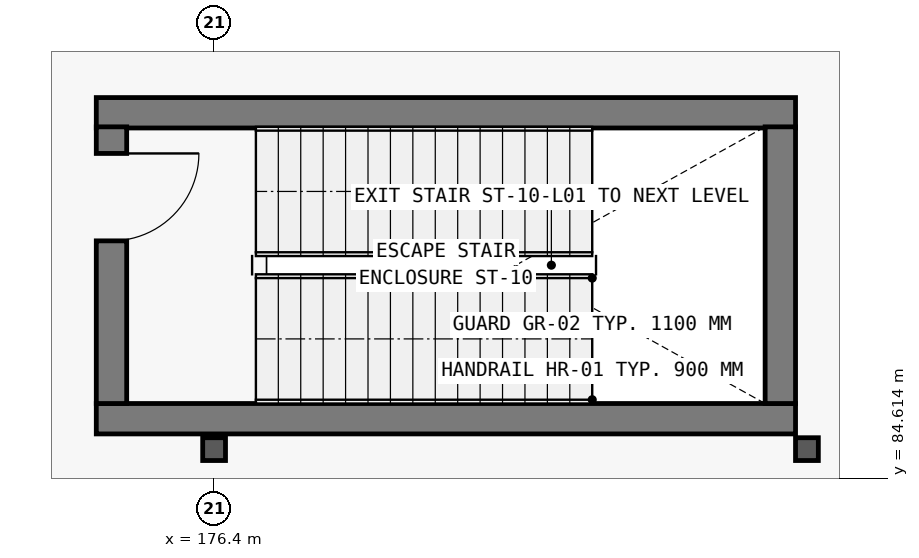
"""IFC4 building model, lengths in metres.
Left out: names, types, materials, properties, quantities, classifications, styles, units other than length and angle.
Written with IfcOpenShell. Run it as: python <this file> out.ifc"""

import sys

from ifc_helpers import new_model, si_unit, direction, frame, frame_2d, origin, origin_2d, place, context, subcontext, project, spatial, rectangle, i_section, extrude, element, fill, save


model = new_model("IFC4")
c1 = context("Model", 3, precision=1e-05, world=origin(), true_north=direction((0.0, 1.0)))
c2 = subcontext(c1, "Body", "Model", "MODEL_VIEW")
j1 = project(units=[si_unit("LENGTHUNIT", "METRE"), si_unit("PLANEANGLEUNIT", "RADIAN")], contexts=[c1])
p1 = place(None, origin())
s1 = spatial("IfcSite", under=j1, at=p1, CompositionType="ELEMENT")
p2 = place(p1, origin())
s2 = spatial("IfcBuilding", under=s1, at=p2, CompositionType="ELEMENT")
p3 = place(p2, frame((0.0, 0.0, 5.4)))
s3 = spatial("IfcBuildingStorey", under=s2, at=p3, CompositionType="ELEMENT", Elevation=5.4)
for number, where, z_axis, x_axis in (
    (1, (176.4, 85.0, 0.0), (0.0, 0.0, 1.0), (1.0, 0.0, 0.0)),
    (2, (184.2, 85.0, 0.0), (0.0, 0.0, 1.0), (1.0, 0.0, 0.0)),
):
    element("IfcColumn", number, at=place(p3, frame(where, z_axis=z_axis, x_axis=x_axis)), inside=s3, PredefinedType="COLUMN", context=c2, shape_type="SweptSolid", body=[
        extrude(i_section(OverallWidth=0.3, OverallDepth=0.3, WebThickness=0.011, FlangeThickness=0.019, at=origin_2d()), origin(), (0.0, 0.0, 1.0), 5.4),
    ])
for number, where, z_axis, x_axis in (
    (3, (174.85, 85.4, 0.0), (0.0, 0.0, 1.0), (1.0, 0.0, 0.0)),
    (4, (184.05, 89.425, 0.0), (0.0, 0.0, 1.0), (-1.0, 0.0, 0.0)),
):
    element("IfcWall", number, at=place(p3, frame(where, z_axis=z_axis, x_axis=x_axis)), inside=s3, PredefinedType="SHEAR", context=c2, shape_type="SweptSolid", body=[
        extrude(rectangle(XDim=9.2, YDim=0.4, at=frame_2d((4.6, 0.0))), origin(), (0.0, 0.0, 1.0), 5.08),
    ])
p4 = place(p3, frame((175.05, 89.24, 0.0), z_axis=(0.0, 0.0, 1.0), x_axis=(0.0, -1.0, 0.0)))
e5 = element("IfcWall", 5, at=p4, inside=s3, PredefinedType="SHEAR", context=c2, shape_type="SweptSolid", body=[
    extrude(rectangle(XDim=3.64, YDim=0.4, at=frame_2d((1.82, 0.0))), origin(), (0.0, 0.0, 1.0), 5.08),
])
p5 = place(p4, frame((0.35, 0.0, 0.0)))
e6 = element("IfcOpeningElement", 6, at=p5, cuts=e5, PredefinedType="OPENING", context=c2, shape_type="SweptSolid", body=[
    extrude(rectangle(XDim=1.15, YDim=2.2, at=frame_2d((0.575, 1.1))), frame((0.0, 0.21, 0.0), z_axis=(0.0, -1.0, 0.0), x_axis=(1.0, 0.0, 0.0)), (0.0, 0.0, 1.0), 0.42),
])
p6 = place(p3, frame((183.85, 85.6, 0.0), z_axis=(0.0, 0.0, 1.0), x_axis=(0.0, 1.0, 0.0)))
e7 = element("IfcWall", 7, at=p6, inside=s3, PredefinedType="SHEAR", context=c2, shape_type="SweptSolid", body=[
    extrude(rectangle(XDim=3.64, YDim=0.4, at=frame_2d((1.82, 0.0))), origin(), (0.0, 0.0, 1.0), 5.08),
])
p7 = place(p5, origin())
e8 = element("IfcDoor", 8, at=p7, inside=s3, OperationType="SINGLE_SWING_LEFT", PredefinedType="DOOR", context=c2, shape_type="SweptSolid", body=[
    extrude(rectangle(XDim=1.15, YDim=2.2, at=frame_2d((0.575, 1.1))), frame((0.0, 0.025, 0.0), z_axis=(0.0, -1.0, 0.0), x_axis=(1.0, 0.0, 0.0)), (0.0, 0.0, 1.0), 0.05),
])
fill(e6, e8)
save(model, sys.argv[1])
